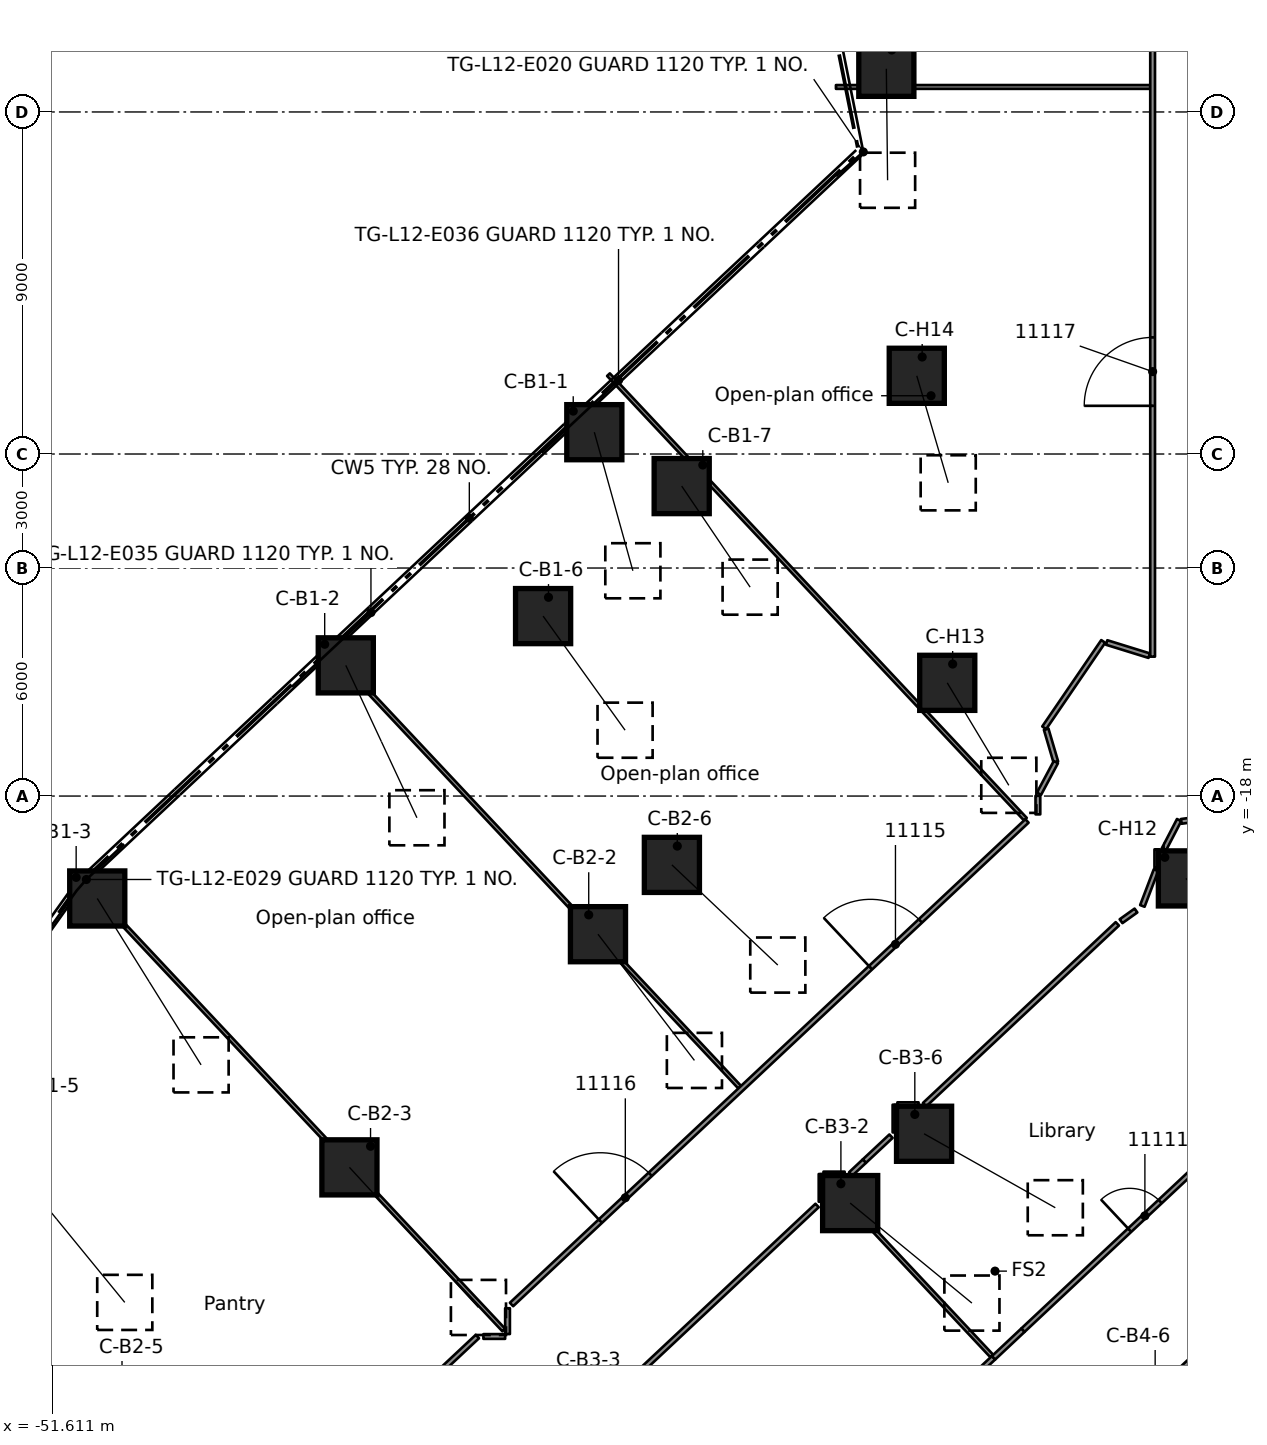
"""IFC4 building model, lengths in metres.
Left out: names, types, materials, properties, quantities, classifications, styles, units other than length and angle.
Written with IfcOpenShell. Run it as: python <this file> out.ifc"""

import sys

from ifc_helpers import new_model, si_unit, direction, frame, frame_2d, origin, origin_2d, place, context, subcontext, project, spatial, rectangle, extrude, element, fill, save


model = new_model("IFC4")
c1 = context("Model", 3, precision=1e-05, world=origin(), true_north=direction((0.0, 1.0)))
c2 = subcontext(c1, "Body", "Model", "MODEL_VIEW")
j1 = project(units=[si_unit("LENGTHUNIT", "METRE"), si_unit("PLANEANGLEUNIT", "RADIAN")], contexts=[c1])
p1 = place(None, origin())
s1 = spatial("IfcSite", under=j1, at=p1, CompositionType="ELEMENT")
p2 = place(p1, origin())
s2 = spatial("IfcBuilding", under=s1, at=p2, CompositionType="ELEMENT")
p3 = place(p2, frame((0.0, 0.0, 54.8)))
s3 = spatial("IfcBuildingStorey", under=s2, at=p3, CompositionType="ELEMENT", Elevation=54.8)
p4 = place(p3, frame((-37.341, -8.426, 0.58), z_axis=(0.21433166656, -0.77054143197, 0.600273136436), x_axis=(0.963423577175, 0.267983228846, 0.0)))
e1 = element("IfcColumn", 1, at=p4, inside=s3, PredefinedType="COLUMN", context=c2, shape_type="SweptSolid", body=[
    extrude(rectangle(XDim=1.45, YDim=1.45, at=origin_2d()), origin(), (0.0, 0.0, 1.0), 4.732),
])
p5 = place(p3, frame((-43.881, -14.561, 0.615), z_axis=(0.358536507446, -0.767991932029, 0.530697621219), x_axis=(0.906119707767, 0.423021364941, 0.0)))
e2 = element("IfcColumn", 2, at=p5, inside=s3, PredefinedType="COLUMN", context=c2, shape_type="SweptSolid", body=[
    extrude(rectangle(XDim=1.45, YDim=1.45, at=origin_2d()), origin(), (0.0, 0.0, 1.0), 5.221),
])
p6 = place(p3, frame((-50.421, -20.695, 0.641), z_axis=(0.468439802399, -0.750675829904, 0.465886198472), x_axis=(0.848370199322, 0.529403442473, 0.0)))
e3 = element("IfcColumn", 3, at=p6, inside=s3, PredefinedType="COLUMN", context=c2, shape_type="SweptSolid", body=[
    extrude(rectangle(XDim=1.45, YDim=1.45, at=origin_2d()), origin(), (0.0, 0.0, 1.0), 5.832),
])
p7 = place(p3, frame((-53.276, -26.947, 0.655), z_axis=(0.571623475147, -0.698941208032, 0.429799709603), x_axis=(0.774086203175, 0.633080208231, 0.0)))
e4 = element("IfcColumn", 4, at=p7, inside=s3, PredefinedType="COLUMN", context=c2, shape_type="SweptSolid", body=[
    extrude(rectangle(XDim=1.45, YDim=1.45, at=origin_2d()), origin(), (0.0, 0.0, 1.0), 6.261),
])
p8 = place(p3, frame((-38.689, -13.265, 0.574), z_axis=(0.461975351775, -0.643000667887, 0.610842791108), x_axis=(0.812123925457, 0.583484986697, 0.0)))
e5 = element("IfcColumn", 5, at=p8, inside=s3, PredefinedType="COLUMN", context=c2, shape_type="SweptSolid", body=[
    extrude(rectangle(XDim=1.45, YDim=1.45, at=origin_2d()), origin(), (0.0, 0.0, 1.0), 4.669),
])
p9 = place(p3, frame((-35.042, -9.844, 0.536), z_axis=(0.414374106339, -0.611759304886, 0.673828355652), x_axis=(0.827946018068, 0.56080780234, 0.0)))
e6 = element("IfcColumn", 6, at=p9, inside=s3, PredefinedType="COLUMN", context=c2, shape_type="SweptSolid", body=[
    extrude(rectangle(XDim=1.45, YDim=1.45, at=origin_2d()), origin(), (0.0, 0.0, 1.0), 4.346),
])
p10 = place(p3, frame((-37.245, -21.635, 0.603), z_axis=(0.504783779983, -0.660501515881, 0.55581569156), x_axis=(0.794535193581, 0.607218104276, 0.0)))
e7 = element("IfcColumn", 7, at=p10, inside=s3, PredefinedType="COLUMN", context=c2, shape_type="SweptSolid", body=[
    extrude(rectangle(XDim=1.45, YDim=1.45, at=origin_2d()), origin(), (0.0, 0.0, 1.0), 5.028),
])
p11 = place(p3, frame((-43.785, -27.77, 0.637), z_axis=(0.595118593192, -0.646131203798, 0.477858062102), x_axis=(0.735546382891, 0.677474367498, 0.0)))
e8 = element("IfcColumn", 8, at=p11, inside=s3, PredefinedType="COLUMN", context=c2, shape_type="SweptSolid", body=[
    extrude(rectangle(XDim=1.45, YDim=1.45, at=origin_2d()), origin(), (0.0, 0.0, 1.0), 5.705),
])
p12 = place(p3, frame((-35.3, -19.811, 0.583), z_axis=(0.584399803244, -0.552712392749, 0.594126148953), x_axis=(0.687135400222, 0.726529381211, 0.0)))
e9 = element("IfcColumn", 9, at=p12, inside=s3, PredefinedType="COLUMN", context=c2, shape_type="SweptSolid", body=[
    extrude(rectangle(XDim=1.45, YDim=1.45, at=origin_2d()), origin(), (0.0, 0.0, 1.0), 4.769),
])
p13 = place(p3, frame((-30.609, -28.71, 0.601), z_axis=(0.640539472129, -0.526030167731, 0.559465322681), x_axis=(0.634647743871, 0.77280155357, 0.0)))
e10 = element("IfcColumn", 10, at=p13, inside=s3, PredefinedType="COLUMN", context=c2, shape_type="SweptSolid", body=[
    extrude(rectangle(XDim=1.45, YDim=1.45, at=origin_2d()), origin(), (0.0, 0.0, 1.0), 5.002),
])
p14 = place(p3, frame((-28.664, -26.886, 0.591), z_axis=(0.710018665714, -0.400138488717, 0.579450329351), x_axis=(0.490962919212, 0.871180470373, 0.0)))
e11 = element("IfcColumn", 11, at=p14, inside=s3, PredefinedType="COLUMN", context=c2, shape_type="SweptSolid", body=[
    extrude(rectangle(XDim=1.45, YDim=1.45, at=origin_2d()), origin(), (0.0, 0.0, 1.0), 4.864),
])
p15 = place(p3, frame((-21.774, -20.167, 0.508), z_axis=(0.501160289027, -0.490424057431, 0.712967466716), x_axis=(0.699409692761, 0.714720981693, 0.0)))
e12 = element("IfcColumn", 12, at=p15, inside=s3, PredefinedType="COLUMN", context=c2, shape_type="SweptSolid", body=[
    extrude(rectangle(XDim=1.45, YDim=1.45, at=origin_2d()), origin(), (0.0, 0.0, 1.0), 4.184),
])
p16 = place(p3, frame((-28.054, -15.021, 0.53), z_axis=(0.376150796059, -0.626275485165, 0.682854007315), x_axis=(0.857260034443, 0.514883708566, 0.0)))
e13 = element("IfcColumn", 13, at=p16, inside=s3, PredefinedType="COLUMN", context=c2, shape_type="SweptSolid", body=[
    extrude(rectangle(XDim=1.45, YDim=1.45, at=origin_2d()), origin(), (0.0, 0.0, 1.0), 4.306),
])
p17 = place(p3, frame((-28.856, -6.942, 0.509), z_axis=(0.197598545942, -0.672955189678, 0.712801604464), x_axis=(0.959492559791, 0.281733966191, 0.0)))
e14 = element("IfcColumn", 14, at=p17, inside=s3, PredefinedType="COLUMN", context=c2, shape_type="SweptSolid", body=[
    extrude(rectangle(XDim=1.45, YDim=1.45, at=origin_2d()), origin(), (0.0, 0.0, 1.0), 4.185),
])
p18 = place(p3, frame((-29.657, 1.136, 0.508), z_axis=(0.007877610375, -0.701048970737, 0.713069620643), x_axis=(0.999936872126, 0.011236180934, 0.0)))
e15 = element("IfcColumn", 15, at=p18, inside=s3, PredefinedType="COLUMN", context=c2, shape_type="SweptSolid", body=[
    extrude(rectangle(XDim=1.45, YDim=1.45, at=origin_2d()), origin(), (0.0, 0.0, 1.0), 4.184),
])
p19 = place(p3, frame((-50.979, -20.052, 0.0), z_axis=(0.0, 0.0, 1.0), x_axis=(0.684158310291, -0.729333535812, 0.0)))
e16 = element("IfcWall", 16, at=p19, inside=s3, PredefinedType="PARTITIONING", context=c2, shape_type="SweptSolid", body=[
    extrude(rectangle(XDim=16.451, YDim=0.1, at=frame_2d((8.225, 0.0))), origin(), (0.0, 0.0, 1.0), 3.58),
])
p20 = place(p3, frame((-44.487, -13.964, 0.0), z_axis=(0.0, 0.0, 1.0), x_axis=(0.684144686813, -0.729346315207, 0.0)))
e17 = element("IfcWall", 17, at=p20, inside=s3, PredefinedType="PARTITIONING", context=c2, shape_type="SweptSolid", body=[
    extrude(rectangle(XDim=16.036, YDim=0.1, at=frame_2d((8.018, 0.0))), origin(), (0.0, 0.0, 1.0), 3.58),
])
p21 = place(p3, frame((-31.274, -28.052, 0.0), z_axis=(0.0, 0.0, 1.0), x_axis=(0.684140939344, -0.729349830406, 0.0)))
e18 = element("IfcWall", 18, at=p21, inside=s3, PredefinedType="PARTITIONING", context=c2, shape_type="SweptSolid", body=[
    extrude(rectangle(XDim=6.421, YDim=0.1, at=frame_2d((3.21, 0.0))), origin(), (0.0, 0.0, 1.0), 3.58),
])
p22 = place(p3, frame((-36.969, -6.912, 0.0), z_axis=(0.0, 0.0, 1.0), x_axis=(0.684114300723, -0.729374816913, 0.0)))
e19 = element("IfcWall", 19, at=p22, inside=s3, PredefinedType="PARTITIONING", context=c2, shape_type="SweptSolid", body=[
    extrude(rectangle(XDim=16.037, YDim=0.1, at=frame_2d((8.018, 0.0))), origin(), (0.0, 0.0, 1.0), 3.58),
])
p23 = place(p3, frame((-25.451, -16.24, 0.0), z_axis=(0.0, 0.0, 1.0), x_axis=(0.282063930775, -0.959395611286, 0.0)))
e20 = element("IfcWall", 20, at=p23, inside=s3, PredefinedType="PARTITIONING", context=c2, shape_type="SweptSolid", body=[
    extrude(rectangle(XDim=0.904, YDim=0.125, at=frame_2d((0.452, 0.0))), origin(), (0.0, 0.0, 1.0), 3.58),
])
p24 = place(p3, frame((-21.9, -18.667, 0.0), z_axis=(0.0, 0.0, 1.0), x_axis=(0.991100480157, 0.133115882725, 0.0)))
e21 = element("IfcWall", 21, at=p24, inside=s3, PredefinedType="PARTITIONING", context=c2, shape_type="SweptSolid", body=[
    extrude(rectangle(XDim=0.856, YDim=0.125, at=frame_2d((0.428, 0.0))), origin(), (0.0, 0.0, 1.0), 3.58),
])
p25 = place(p3, frame((-23.86, -13.959, 0.0), z_axis=(0.0, 0.0, 1.0), x_axis=(0.955232666744, -0.295855627603, 0.0)))
e22 = element("IfcWall", 22, at=p25, inside=s3, PredefinedType="PARTITIONING", context=c2, shape_type="SweptSolid", body=[
    extrude(rectangle(XDim=1.173, YDim=0.125, at=frame_2d((0.586, 0.0))), origin(), (0.0, 0.0, 1.0), 3.58),
])
p26 = place(p3, frame((-40.26, -32.22, 0.0), z_axis=(0.0, 0.0, 1.0), x_axis=(1.0, 0.0, 0.0)))
e23 = element("IfcWall", 23, at=p26, inside=s3, PredefinedType="PARTITIONING", context=c2, shape_type="SweptSolid", body=[
    extrude(rectangle(XDim=0.572, YDim=0.125, at=frame_2d((0.286, 0.0))), origin(), (0.0, 0.0, 1.0), 3.58),
])
p27 = place(p3, frame((-31.311, -27.945, 0.0), z_axis=(0.0, 0.0, 1.0), x_axis=(1.0, 0.0, 0.0)))
e24 = element("IfcWall", 24, at=p27, inside=s3, PredefinedType="PARTITIONING", context=c2, shape_type="SweptSolid", body=[
    extrude(rectangle(XDim=0.557, YDim=0.125, at=frame_2d((0.279, 0.0))), origin(), (0.0, 0.0, 1.0), 3.58),
])
p28 = place(p3, frame((-29.366, -26.121, 0.0), z_axis=(0.0, 0.0, 1.0), x_axis=(1.0, 0.0, 0.0)))
e25 = element("IfcWall", 25, at=p28, inside=s3, PredefinedType="PARTITIONING", context=c2, shape_type="SweptSolid", body=[
    extrude(rectangle(XDim=0.557, YDim=0.125, at=frame_2d((0.278, 0.0))), origin(), (0.0, 0.0, 1.0), 3.58),
])
p29 = place(p3, frame((-30.983, 0.658, 0.0), z_axis=(0.0, 0.0, 1.0), x_axis=(1.0, 0.0, 0.0)))
e26 = element("IfcWall", 26, at=p29, inside=s3, PredefinedType="PARTITIONING", context=c2, shape_type="SweptSolid", body=[
    extrude(rectangle(XDim=8.271, YDim=0.1, at=frame_2d((4.135, 0.0))), origin(), (0.0, 0.0, 1.0), 3.58),
])
p30 = place(p3, frame((-23.481, -21.293, 0.0), z_axis=(0.0, 0.0, 1.0), x_axis=(0.813494420515, 0.581572719263, 0.0)))
e27 = element("IfcWall", 27, at=p30, inside=s3, PredefinedType="PARTITIONING", context=c2, shape_type="SweptSolid", body=[
    extrude(rectangle(XDim=0.483, YDim=0.125, at=frame_2d((0.242, 0.0))), origin(), (0.0, 0.0, 1.0), 3.58),
])
p31 = place(p3, frame((-30.236, -27.607, 0.0), z_axis=(0.0, 0.0, 1.0), x_axis=(0.730201947911, 0.683231377548, 0.0)))
e28 = element("IfcWall", 28, at=p31, inside=s3, PredefinedType="PARTITIONING", context=c2, shape_type="SweptSolid", body=[
    extrude(rectangle(XDim=0.962, YDim=0.125, at=frame_2d((0.481, 0.0))), origin(), (0.0, 0.0, 1.0), 3.58),
])
p32 = place(p3, frame((-41.642, -33.368, 0.0), z_axis=(0.0, 0.0, 1.0), x_axis=(0.729727797371, 0.683737772647, 0.0)))
e29 = element("IfcWall", 29, at=p32, inside=s3, PredefinedType="PARTITIONING", context=c2, shape_type="SweptSolid", body=[
    extrude(rectangle(XDim=1.677, YDim=0.125, at=frame_2d((0.839, 0.0))), origin(), (0.0, 0.0, 1.0), 3.58),
])
p33 = place(p3, frame((-19.689, -31.014, 0.0), z_axis=(0.0, 0.0, 1.0), x_axis=(-0.72947037737, -0.684012403791, 0.0)))
e30 = element("IfcWall", 30, at=p33, inside=s3, PredefinedType="PARTITIONING", context=c2, shape_type="SweptSolid", body=[
    extrude(rectangle(XDim=3.19, YDim=0.125, at=frame_2d((1.595, 0.0))), origin(), (0.0, 0.0, 1.0), 3.58),
])
p34 = place(p33, frame((0.456, 0.0, 0.0)))
e31 = element("IfcOpeningElement", 31, at=p34, cuts=e30, PredefinedType="OPENING", context=c2, shape_type="SweptSolid", body=[
    extrude(rectangle(XDim=0.9, YDim=2.1, at=frame_2d((0.45, 1.05))), frame((0.0, 0.073, 0.0), z_axis=(0.0, -1.0, 0.0), x_axis=(1.0, 0.0, 0.0)), (0.0, 0.0, 1.0), 0.145),
])
p35 = place(p3, frame((-32.218, -37.828, 0.0), z_axis=(0.0, 0.0, 1.0), x_axis=(0.729395805056, 0.68409192333, 0.0)))
e32 = element("IfcWall", 32, at=p35, inside=s3, PredefinedType="PARTITIONING", context=c2, shape_type="SweptSolid", body=[
    extrude(rectangle(XDim=7.377, YDim=0.125, at=frame_2d((3.689, 0.0))), origin(), (0.0, 0.0, 1.0), 3.58),
])
p36 = place(p35, frame((3.206, 0.0, 0.0)))
e33 = element("IfcOpeningElement", 33, at=p36, cuts=e32, PredefinedType="OPENING", context=c2, shape_type="SweptSolid", body=[
    extrude(rectangle(XDim=1.0, YDim=2.1, at=frame_2d((0.5, 1.05))), frame((0.0, 0.073, 0.0), z_axis=(0.0, -1.0, 0.0), x_axis=(1.0, 0.0, 0.0)), (0.0, 0.0, 1.0), 0.145),
])
p37 = place(p3, frame((-26.063, -32.055, 0.0), z_axis=(0.0, 0.0, 1.0), x_axis=(0.729480399327, 0.684001715639, 0.0)))
e34 = element("IfcWall", 34, at=p37, inside=s3, PredefinedType="PARTITIONING", context=c2, shape_type="SweptSolid", body=[
    extrude(rectangle(XDim=8.444, YDim=0.125, at=frame_2d((4.222, 0.0))), origin(), (0.0, 0.0, 1.0), 3.58),
])
p38 = place(p37, frame((3.85, 0.0, 0.0)))
e35 = element("IfcOpeningElement", 35, at=p38, cuts=e34, PredefinedType="OPENING", context=c2, shape_type="SweptSolid", body=[
    extrude(rectangle(XDim=1.1, YDim=2.1, at=frame_2d((0.55, 1.05))), frame((0.0, 0.073, 0.0), z_axis=(0.0, -1.0, 0.0), x_axis=(1.0, 0.0, 0.0)), (0.0, 0.0, 1.0), 0.145),
])
p39 = place(p3, frame((-26.836, -32.781, 0.0), z_axis=(0.0, 0.0, 1.0), x_axis=(0.728861997168, 0.684660637896, 0.0)))
e36 = element("IfcWall", 36, at=p39, inside=s3, PredefinedType="PARTITIONING", context=c2, shape_type="SweptSolid", body=[
    extrude(rectangle(XDim=1.061, YDim=0.125, at=frame_2d((0.53, 0.0))), origin(), (0.0, 0.0, 1.0), 3.58),
])
p40 = place(p3, frame((-37.138, -34.08, 0.0), z_axis=(0.0, 0.0, 1.0), x_axis=(0.729416485857, 0.684069872279, 0.0)))
e37 = element("IfcWall", 37, at=p40, inside=s3, PredefinedType="PARTITIONING", context=c2, shape_type="SweptSolid", body=[
    extrude(rectangle(XDim=7.758, YDim=0.125, at=frame_2d((3.879, 0.0))), origin(), (0.0, 0.0, 1.0), 3.58),
])
p41 = place(p3, frame((-28.651, -26.121, 0.0), z_axis=(0.0, 0.0, 1.0), x_axis=(0.729302874573, 0.684190994635, 0.0)))
e38 = element("IfcWall", 38, at=p41, inside=s3, PredefinedType="PARTITIONING", context=c2, shape_type="SweptSolid", body=[
    extrude(rectangle(XDim=6.954, YDim=0.125, at=frame_2d((3.477, 0.0))), origin(), (0.0, 0.0, 1.0), 3.58),
])
p42 = place(p3, frame((-30.596, -27.945, 0.0), z_axis=(0.0, 0.0, 1.0), x_axis=(0.728765825334, 0.68476300413, 0.0)))
e39 = element("IfcWall", 39, at=p42, inside=s3, PredefinedType="PARTITIONING", context=c2, shape_type="SweptSolid", body=[
    extrude(rectangle(XDim=0.494, YDim=0.125, at=frame_2d((0.247, 0.0))), origin(), (0.0, 0.0, 1.0), 3.58),
])
p43 = place(p3, frame((-39.52, -31.378, 0.0), z_axis=(0.0, 0.0, 1.0), x_axis=(0.729357865, 0.684132373713, 0.0)))
e40 = element("IfcWall", 40, at=p43, inside=s3, PredefinedType="PARTITIONING", context=c2, shape_type="SweptSolid", body=[
    extrude(rectangle(XDim=18.597, YDim=0.125, at=frame_2d((9.299, 0.0))), origin(), (0.0, 0.0, 1.0), 3.58),
])
p44 = place(p43, frame((12.952, 0.0, 0.0)))
e41 = element("IfcOpeningElement", 41, at=p44, cuts=e40, PredefinedType="OPENING", context=c2, shape_type="SweptSolid", body=[
    extrude(rectangle(XDim=1.8, YDim=2.1, at=frame_2d((0.9, 1.05))), frame((0.0, 0.073, 0.0), z_axis=(0.0, -1.0, 0.0), x_axis=(1.0, 0.0, 0.0)), (0.0, 0.0, 1.0), 0.145),
])
p45 = place(p43, frame((3.206, 0.0, 0.0)))
e42 = element("IfcOpeningElement", 42, at=p45, cuts=e40, PredefinedType="OPENING", context=c2, shape_type="SweptSolid", body=[
    extrude(rectangle(XDim=1.8, YDim=2.1, at=frame_2d((0.9, 1.05))), frame((0.0, 0.073, 0.0), z_axis=(0.0, -1.0, 0.0), x_axis=(1.0, 0.0, 0.0)), (0.0, 0.0, 1.0), 0.145),
])
p46 = place(p3, frame((-21.953, -18.632, 0.0), z_axis=(0.0, 0.0, 1.0), x_axis=(-0.460802463587, -0.887502726504, 0.0)))
e43 = element("IfcWall", 43, at=p46, inside=s3, PredefinedType="PARTITIONING", context=c2, shape_type="SweptSolid", body=[
    extrude(rectangle(XDim=0.866, YDim=0.125, at=frame_2d((0.433, 0.0))), origin(), (0.0, 0.0, 1.0), 3.58),
])
p47 = place(p3, frame((-25.196, -17.107, 0.0), z_axis=(0.0, 0.0, 1.0), x_axis=(-0.470668857684, -0.882309937837, 0.0)))
e44 = element("IfcWall", 44, at=p47, inside=s3, PredefinedType="PARTITIONING", context=c2, shape_type="SweptSolid", body=[
    extrude(rectangle(XDim=0.943, YDim=0.125, at=frame_2d((0.472, 0.0))), origin(), (0.0, 0.0, 1.0), 3.58),
])
p48 = place(p3, frame((-25.503, -16.204, 0.0), z_axis=(0.0, 0.0, 1.0), x_axis=(0.564098814863, 0.825707288978, 0.0)))
e45 = element("IfcWall", 45, at=p48, inside=s3, PredefinedType="PARTITIONING", context=c2, shape_type="SweptSolid", body=[
    extrude(rectangle(XDim=2.753, YDim=0.125, at=frame_2d((1.376, 0.0))), origin(), (0.0, 0.0, 1.0), 3.58),
])
p49 = place(p3, frame((-22.92, -20.891, 0.0), z_axis=(0.0, 0.0, 1.0), x_axis=(0.35597518747, 0.934495407108, 0.0)))
e46 = element("IfcWall", 46, at=p49, inside=s3, PredefinedType="PARTITIONING", context=c2, shape_type="SweptSolid", body=[
    extrude(rectangle(XDim=1.008, YDim=0.125, at=frame_2d((0.504, 0.0))), origin(), (0.0, 0.0, 1.0), 3.58),
])
p50 = place(p3, frame((-22.539, -19.891, 0.0), z_axis=(0.0, 0.0, 1.0), x_axis=(0.0, 1.0, 0.0)))
e47 = element("IfcWall", 47, at=p50, inside=s3, PredefinedType="PARTITIONING", context=c2, shape_type="SweptSolid", body=[
    extrude(rectangle(XDim=0.489, YDim=0.125, at=frame_2d((0.245, 0.0))), origin(), (0.0, 0.0, 1.0), 3.58),
])
p51 = place(p3, frame((-22.65, -14.332, 0.0), z_axis=(0.0, 0.0, 1.0), x_axis=(0.0, 1.0, 0.0)))
e48 = element("IfcWall", 48, at=p51, inside=s3, PredefinedType="PARTITIONING", context=c2, shape_type="SweptSolid", body=[
    extrude(rectangle(XDim=29.983, YDim=0.125, at=frame_2d((14.991, 0.0))), origin(), (0.0, 0.0, 1.0), 3.58),
])
p52 = place(p51, frame((6.6, 0.0, 0.0)))
e49 = element("IfcOpeningElement", 49, at=p52, cuts=e48, PredefinedType="OPENING", context=c2, shape_type="SweptSolid", body=[
    extrude(rectangle(XDim=1.8, YDim=2.1, at=frame_2d((0.9, 1.05))), frame((0.0, 0.073, 0.0), z_axis=(0.0, -1.0, 0.0), x_axis=(1.0, 0.0, 0.0)), (0.0, 0.0, 1.0), 0.145),
])
p53 = place(p51, frame((21.59, 0.0, 0.0)))
e50 = element("IfcOpeningElement", 50, at=p53, cuts=e48, PredefinedType="OPENING", context=c2, shape_type="SweptSolid", body=[
    extrude(rectangle(XDim=1.8, YDim=2.1, at=frame_2d((0.9, 1.05))), frame((0.0, 0.073, 0.0), z_axis=(0.0, -1.0, 0.0), x_axis=(1.0, 0.0, 0.0)), (0.0, 0.0, 1.0), 0.145),
])
p54 = place(p3, frame((-25.669, -18.482, 0.0), z_axis=(0.0, 0.0, 1.0), x_axis=(0.0, 1.0, 0.0)))
e51 = element("IfcWall", 51, at=p54, inside=s3, PredefinedType="PARTITIONING", context=c2, shape_type="SweptSolid", body=[
    extrude(rectangle(XDim=0.488, YDim=0.125, at=frame_2d((0.244, 0.0))), origin(), (0.0, 0.0, 1.0), 3.58),
])
p55 = place(p3, frame((-29.429, -26.851, 0.0), z_axis=(0.0, 0.0, 1.0), x_axis=(0.0, 1.0, 0.0)))
e52 = element("IfcWall", 52, at=p55, inside=s3, PredefinedType="PARTITIONING", context=c2, shape_type="SweptSolid", body=[
    extrude(rectangle(XDim=0.73, YDim=0.125, at=frame_2d((0.365, 0.0))), origin(), (0.0, 0.0, 1.0), 3.58),
])
p56 = place(p3, frame((-31.374, -28.674, 0.0), z_axis=(0.0, 0.0, 1.0), x_axis=(0.0, 1.0, 0.0)))
e53 = element("IfcWall", 53, at=p56, inside=s3, PredefinedType="PARTITIONING", context=c2, shape_type="SweptSolid", body=[
    extrude(rectangle(XDim=0.729, YDim=0.125, at=frame_2d((0.365, 0.0))), origin(), (0.0, 0.0, 1.0), 3.58),
])
p57 = place(p3, frame((-39.625, -32.156, 0.0), z_axis=(0.0, 0.0, 1.0), x_axis=(0.0, 1.0, 0.0)))
e54 = element("IfcWall", 54, at=p57, inside=s3, PredefinedType="PARTITIONING", context=c2, shape_type="SweptSolid", body=[
    extrude(rectangle(XDim=0.679, YDim=0.125, at=frame_2d((0.339, 0.0))), origin(), (0.0, 0.0, 1.0), 3.58),
])
p58 = place(p38, origin())
e55 = element("IfcDoor", 55, at=p58, inside=s3, OperationType="SINGLE_SWING_RIGHT", PredefinedType="DOOR", context=c2, shape_type="SweptSolid", body=[
    extrude(rectangle(XDim=1.1, YDim=2.1, at=frame_2d((0.55, 1.05))), frame((0.0, 0.025, 0.0), z_axis=(0.0, -1.0, 0.0), x_axis=(1.0, 0.0, 0.0)), (0.0, 0.0, 1.0), 0.05),
])
fill(e35, e55)
p59 = place(p44, origin())
e56 = element("IfcDoor", 56, at=p59, inside=s3, OperationType="DOUBLE_DOOR_SINGLE_SWING", PredefinedType="DOOR", context=c2, shape_type="SweptSolid", body=[
    extrude(rectangle(XDim=1.8, YDim=2.1, at=frame_2d((0.9, 1.05))), frame((0.0, 0.025, 0.0), z_axis=(0.0, -1.0, 0.0), x_axis=(1.0, 0.0, 0.0)), (0.0, 0.0, 1.0), 0.05),
])
fill(e41, e56)
p60 = place(p45, origin())
e57 = element("IfcDoor", 57, at=p60, inside=s3, OperationType="DOUBLE_DOOR_SINGLE_SWING", PredefinedType="DOOR", context=c2, shape_type="SweptSolid", body=[
    extrude(rectangle(XDim=1.8, YDim=2.1, at=frame_2d((0.9, 1.05))), frame((0.0, 0.025, 0.0), z_axis=(0.0, -1.0, 0.0), x_axis=(1.0, 0.0, 0.0)), (0.0, 0.0, 1.0), 0.05),
])
fill(e42, e57)
p61 = place(p52, origin())
e58 = element("IfcDoor", 58, at=p61, inside=s3, OperationType="DOUBLE_DOOR_SINGLE_SWING", PredefinedType="DOOR", context=c2, shape_type="SweptSolid", body=[
    extrude(rectangle(XDim=1.8, YDim=2.1, at=frame_2d((0.9, 1.05))), frame((0.0, 0.025, 0.0), z_axis=(0.0, -1.0, 0.0), x_axis=(1.0, 0.0, 0.0)), (0.0, 0.0, 1.0), 0.05),
])
fill(e49, e58)
save(model, sys.argv[1])
